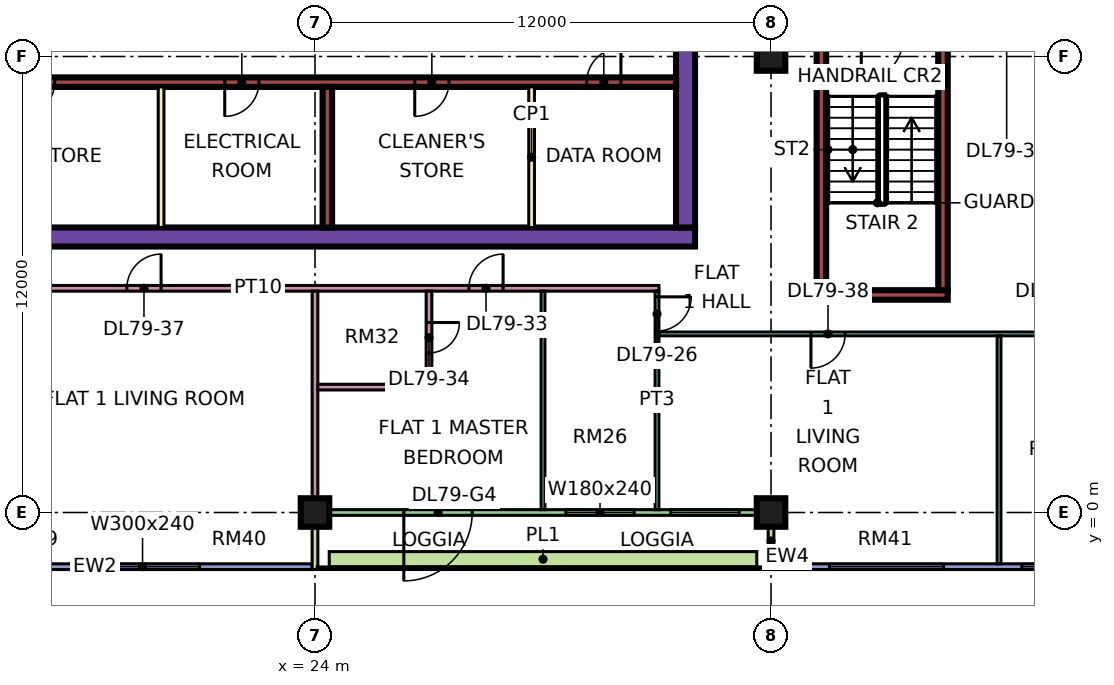
"""IFC4 building model, lengths in metres.
Left out: names, types, materials, properties, quantities, classifications, styles, units other than length and angle.
Written with IfcOpenShell. Run it as: python <this file> out.ifc"""

import sys

from ifc_helpers import new_model, si_unit, direction, frame, frame_2d, origin, origin_2d, place, context, subcontext, project, spatial, rectangle, extrude, element, fill, save


model = new_model("IFC4")
c1 = context("Model", 3, precision=1e-05, world=origin(), true_north=direction((0.0, 1.0)))
c2 = subcontext(c1, "Body", "Model", "MODEL_VIEW")
j1 = project(units=[si_unit("LENGTHUNIT", "METRE"), si_unit("PLANEANGLEUNIT", "RADIAN")], contexts=[c1])
p1 = place(None, origin())
s1 = spatial("IfcSite", under=j1, at=p1, CompositionType="ELEMENT")
p2 = place(p1, origin())
s2 = spatial("IfcBuilding", under=s1, at=p2, CompositionType="ELEMENT")
p3 = place(p2, frame((0.0, 0.0, 342.65)))
s3 = spatial("IfcBuildingStorey", under=s2, at=p3, CompositionType="ELEMENT", Elevation=342.65)
for number, where, z_axis, x_axis in (
    (1, (24.0, 0.0, 0.0), (0.0, 0.0, 1.0), (1.0, 0.0, 0.0)),
    (2, (36.0, 0.0, 0.0), (0.0, 0.0, 1.0), (1.0, 0.0, 0.0)),
    (3, (36.0, 12.0, 0.0), (0.0, 0.0, 1.0), (1.0, 0.0, 0.0)),
):
    element("IfcColumn", number, at=place(p3, frame(where, z_axis=z_axis, x_axis=x_axis)), inside=s3, PredefinedType="COLUMN", context=c2, shape_type="SweptSolid", body=[
        extrude(rectangle(XDim=0.75, YDim=0.75, at=origin_2d()), origin(), (0.0, 0.0, 1.0), 3.75),
    ])
p4 = place(p3, frame((9.0, 7.25, 0.0), z_axis=(0.0, 0.0, 1.0), x_axis=(1.0, 0.0, 0.0)))
e4 = element("IfcWall", 4, at=p4, inside=s3, PredefinedType="SHEAR", context=c2, shape_type="SweptSolid", body=[
    extrude(rectangle(XDim=25.0, YDim=0.5, at=frame_2d((12.5, 0.0))), origin(), (0.0, 0.0, 1.0), 3.75),
])
p5 = place(p3, frame((33.75, 7.5, 0.0), z_axis=(0.0, 0.0, 1.0), x_axis=(0.0, 1.0, 0.0)))
e5 = element("IfcWall", 5, at=p5, inside=s3, PredefinedType="SHEAR", context=c2, shape_type="SweptSolid", body=[
    extrude(rectangle(XDim=12.0, YDim=0.5, at=frame_2d((6.0, 0.0))), origin(), (0.0, 0.0, 1.0), 3.75),
])
p6 = place(p5, frame((5.7, 0.0, 0.0)))
e6 = element("IfcOpeningElement", 6, at=p6, cuts=e5, PredefinedType="OPENING", context=c2, shape_type="SweptSolid", body=[
    extrude(rectangle(XDim=1.8, YDim=2.4, at=frame_2d((0.9, 1.2))), frame((0.0, 0.26, 0.0), z_axis=(0.0, -1.0, 0.0), x_axis=(1.0, 0.0, 0.0)), (0.0, 0.0, 1.0), 0.52),
])
p7 = place(p3, frame((13.45, 11.325, 0.0), z_axis=(0.0, 0.0, 1.0), x_axis=(1.0, 0.0, 0.0)))
e7 = element("IfcWall", 7, at=p7, inside=s3, PredefinedType="SHEAR", context=c2, shape_type="SweptSolid", body=[
    extrude(rectangle(XDim=20.05, YDim=0.25, at=frame_2d((10.025, 0.0))), origin(), (0.0, 0.0, 1.0), 3.75),
])
p8 = place(p7, frame((2.8, 0.0, 0.0)))
e8 = element("IfcOpeningElement", 8, at=p8, cuts=e7, PredefinedType="OPENING", context=c2, shape_type="SweptSolid", body=[
    extrude(rectangle(XDim=0.9, YDim=2.1, at=frame_2d((0.45, 1.05))), frame((0.0, 0.135, 0.0), z_axis=(0.0, -1.0, 0.0), x_axis=(1.0, 0.0, 0.0)), (0.0, 0.0, 1.0), 0.27),
])
p9 = place(p7, frame((8.175, 0.0, 0.0)))
e9 = element("IfcOpeningElement", 9, at=p9, cuts=e7, PredefinedType="OPENING", context=c2, shape_type="SweptSolid", body=[
    extrude(rectangle(XDim=0.9, YDim=2.1, at=frame_2d((0.45, 1.05))), frame((0.0, 0.135, 0.0), z_axis=(0.0, -1.0, 0.0), x_axis=(1.0, 0.0, 0.0)), (0.0, 0.0, 1.0), 0.27),
])
p10 = place(p7, frame((13.175, 0.0, 0.0)))
e10 = element("IfcOpeningElement", 10, at=p10, cuts=e7, PredefinedType="OPENING", context=c2, shape_type="SweptSolid", body=[
    extrude(rectangle(XDim=0.9, YDim=2.1, at=frame_2d((0.45, 1.05))), frame((0.0, 0.135, 0.0), z_axis=(0.0, -1.0, 0.0), x_axis=(1.0, 0.0, 0.0)), (0.0, 0.0, 1.0), 0.27),
])
p11 = place(p7, frame((17.7, 0.0, 0.0)))
e11 = element("IfcOpeningElement", 11, at=p11, cuts=e7, PredefinedType="OPENING", context=c2, shape_type="SweptSolid", body=[
    extrude(rectangle(XDim=0.9, YDim=2.1, at=frame_2d((0.45, 1.05))), frame((0.0, 0.135, 0.0), z_axis=(0.0, -1.0, 0.0), x_axis=(1.0, 0.0, 0.0)), (0.0, 0.0, 1.0), 0.27),
])
p12 = place(p3, frame((24.325, 7.5, 0.0), z_axis=(0.0, 0.0, 1.0), x_axis=(0.0, 1.0, 0.0)))
e12 = element("IfcWall", 12, at=p12, inside=s3, PredefinedType="SHEAR", context=c2, shape_type="SweptSolid", body=[
    extrude(rectangle(XDim=3.7, YDim=0.25, at=frame_2d((1.85, 0.0))), origin(), (0.0, 0.0, 1.0), 3.75),
])
p13 = place(p3, frame((37.2, 5.725, 0.0), z_axis=(0.0, 0.0, 1.0), x_axis=(1.0, 0.0, 0.0)))
e13 = element("IfcWall", 13, at=p13, inside=s3, PredefinedType="SHEAR", context=c2, shape_type="SweptSolid", body=[
    extrude(rectangle(XDim=3.45, YDim=0.25, at=frame_2d((1.725, 0.0))), origin(), (0.0, 0.0, 1.0), 3.75),
])
for number, where, z_axis, x_axis in (
    (14, (37.325, 5.85, 0.0), (0.0, 0.0, 1.0), (0.0, 1.0, 0.0)),
    (15, (40.525, 5.85, 0.0), (0.0, 0.0, 1.0), (0.0, 1.0, 0.0)),
):
    element("IfcWall", number, at=place(p3, frame(where, z_axis=z_axis, x_axis=x_axis)), inside=s3, PredefinedType="SHEAR", context=c2, shape_type="SweptSolid", body=[
        extrude(rectangle(XDim=6.5, YDim=0.25, at=frame_2d((3.25, 0.0))), origin(), (0.0, 0.0, 1.0), 3.75),
    ])
p14 = place(p3, frame((12.5, -1.425, 0.0), z_axis=(0.0, 0.0, 1.0), x_axis=(1.0, 0.0, 0.0)))
e16 = element("IfcWall", 16, at=p14, inside=s3, PredefinedType="SOLIDWALL", context=c2, shape_type="SweptSolid", body=[
    extrude(rectangle(XDim=11.425, YDim=0.15, at=frame_2d((5.712, 0.0))), origin(), (0.0, 0.0, 1.0), 3.35),
])
p15 = place(p14, frame((0.35, 0.0, 0.45)))
e17 = element("IfcOpeningElement", 17, at=p15, cuts=e16, PredefinedType="OPENING", context=c2, shape_type="SweptSolid", body=[
    extrude(rectangle(XDim=1.8, YDim=2.4, at=frame_2d((0.9, 1.2))), frame((0.0, 0.085, 0.0), z_axis=(0.0, -1.0, 0.0), x_axis=(1.0, 0.0, 0.0)), (0.0, 0.0, 1.0), 0.17),
])
p16 = place(p14, frame((5.462, 0.0, 0.45)))
e18 = element("IfcOpeningElement", 18, at=p16, cuts=e16, PredefinedType="OPENING", context=c2, shape_type="SweptSolid", body=[
    extrude(rectangle(XDim=3.0, YDim=2.4, at=frame_2d((1.5, 1.2))), frame((0.0, 0.085, 0.0), z_axis=(0.0, -1.0, 0.0), x_axis=(1.0, 0.0, 0.0)), (0.0, 0.0, 1.0), 0.17),
])
p17 = place(p3, frame((24.075, 0.0, 0.0), z_axis=(0.0, 0.0, 1.0), x_axis=(1.0, 0.0, 0.0)))
e19 = element("IfcWall", 19, at=p17, inside=s3, PredefinedType="SOLIDWALL", context=c2, shape_type="SweptSolid", body=[
    extrude(rectangle(XDim=11.85, YDim=0.15, at=frame_2d((5.925, 0.0))), origin(), (0.0, 0.0, 1.0), 3.35),
])
p18 = place(p17, frame((2.262, 0.0, 0.0)))
e20 = element("IfcOpeningElement", 20, at=p18, cuts=e19, PredefinedType="OPENING", context=c2, shape_type="SweptSolid", body=[
    extrude(rectangle(XDim=1.8, YDim=2.4, at=frame_2d((0.9, 1.2))), frame((0.0, 0.085, 0.0), z_axis=(0.0, -1.0, 0.0), x_axis=(1.0, 0.0, 0.0)), (0.0, 0.0, 1.0), 0.17),
])
p19 = place(p17, frame((6.525, 0.0, 0.45)))
e21 = element("IfcOpeningElement", 21, at=p19, cuts=e19, PredefinedType="OPENING", context=c2, shape_type="SweptSolid", body=[
    extrude(rectangle(XDim=1.8, YDim=2.4, at=frame_2d((0.9, 1.2))), frame((0.0, 0.085, 0.0), z_axis=(0.0, -1.0, 0.0), x_axis=(1.0, 0.0, 0.0)), (0.0, 0.0, 1.0), 0.17),
])
p20 = place(p17, frame((9.288, 0.0, 0.45)))
e22 = element("IfcOpeningElement", 22, at=p20, cuts=e19, PredefinedType="OPENING", context=c2, shape_type="SweptSolid", body=[
    extrude(rectangle(XDim=1.8, YDim=2.4, at=frame_2d((0.9, 1.2))), frame((0.0, 0.085, 0.0), z_axis=(0.0, -1.0, 0.0), x_axis=(1.0, 0.0, 0.0)), (0.0, 0.0, 1.0), 0.17),
])
for number, where, z_axis, x_axis in (
    (23, (24.0, -1.5, 0.0), (0.0, 0.0, 1.0), (0.0, 1.0, 0.0)),
    (24, (36.0, -1.5, 0.0), (0.0, 0.0, 1.0), (0.0, 1.0, 0.0)),
):
    element("IfcWall", number, at=place(p3, frame(where, z_axis=z_axis, x_axis=x_axis)), inside=s3, PredefinedType="SOLIDWALL", context=c2, shape_type="SweptSolid", body=[
        extrude(rectangle(XDim=1.5, YDim=0.15, at=frame_2d((0.75, 0.0))), origin(), (0.0, 0.0, 1.0), 3.35),
    ])
p21 = place(p3, frame((36.075, -1.425, 0.0), z_axis=(0.0, 0.0, 1.0), x_axis=(1.0, 0.0, 0.0)))
e25 = element("IfcWall", 25, at=p21, inside=s3, PredefinedType="SOLIDWALL", context=c2, shape_type="SweptSolid", body=[
    extrude(rectangle(XDim=11.85, YDim=0.15, at=frame_2d((5.925, 0.0))), origin(), (0.0, 0.0, 1.0), 3.35),
])
p22 = place(p21, frame((1.462, 0.0, 0.45)))
e26 = element("IfcOpeningElement", 26, at=p22, cuts=e25, PredefinedType="OPENING", context=c2, shape_type="SweptSolid", body=[
    extrude(rectangle(XDim=3.0, YDim=2.4, at=frame_2d((1.5, 1.2))), frame((0.0, 0.085, 0.0), z_axis=(0.0, -1.0, 0.0), x_axis=(1.0, 0.0, 0.0)), (0.0, 0.0, 1.0), 0.17),
])
p23 = place(p21, frame((6.525, 0.0, 0.45)))
e27 = element("IfcOpeningElement", 27, at=p23, cuts=e25, PredefinedType="OPENING", context=c2, shape_type="SweptSolid", body=[
    extrude(rectangle(XDim=1.8, YDim=2.4, at=frame_2d((0.9, 1.2))), frame((0.0, 0.085, 0.0), z_axis=(0.0, -1.0, 0.0), x_axis=(1.0, 0.0, 0.0)), (0.0, 0.0, 1.0), 0.17),
])
p24 = place(p21, frame((9.488, 0.0, 0.45)))
e28 = element("IfcOpeningElement", 28, at=p24, cuts=e25, PredefinedType="OPENING", context=c2, shape_type="SweptSolid", body=[
    extrude(rectangle(XDim=1.8, YDim=2.4, at=frame_2d((0.9, 1.2))), frame((0.0, 0.085, 0.0), z_axis=(0.0, -1.0, 0.0), x_axis=(1.0, 0.0, 0.0)), (0.0, 0.0, 1.0), 0.17),
])
p25 = place(p3, frame((24.375, -1.229, 0.0), z_axis=(0.0, 0.0, 1.0), x_axis=(1.0, 0.0, 0.0)))
e29 = element("IfcWall", 29, at=p25, inside=s3, PredefinedType="SOLIDWALL", context=c2, shape_type="SweptSolid", body=[
    extrude(rectangle(XDim=11.25, YDim=0.4, at=frame_2d((5.625, 0.0))), origin(), (0.0, 0.0, 1.0), 0.7),
])
for number, where, z_axis, x_axis in (
    (30, (19.95, 7.5, 0.0), (0.0, 0.0, 1.0), (0.0, 1.0, 0.0)),
    (31, (29.7, 7.5, 0.0), (0.0, 0.0, 1.0), (0.0, 1.0, 0.0)),
):
    element("IfcWall", number, at=place(p3, frame(where, z_axis=z_axis, x_axis=x_axis)), inside=s3, PredefinedType="PARTITIONING", context=c2, shape_type="SweptSolid", body=[
        extrude(rectangle(XDim=3.7, YDim=0.15, at=frame_2d((1.85, 0.0))), origin(), (0.0, 0.0, 1.0), 3.35),
    ])
p26 = place(p3, frame((11.95, 5.9, 0.0), z_axis=(0.0, 0.0, 1.0), x_axis=(1.0, 0.0, 0.0)))
e32 = element("IfcWall", 32, at=p26, inside=s3, PredefinedType="PARTITIONING", context=c2, shape_type="SweptSolid", body=[
    extrude(rectangle(XDim=21.1, YDim=0.15, at=frame_2d((10.55, 0.0))), origin(), (0.0, 0.0, 1.0), 3.35),
])
p27 = place(p26, frame((1.1, 0.0, 0.0)))
e33 = element("IfcOpeningElement", 33, at=p27, cuts=e32, PredefinedType="OPENING", context=c2, shape_type="SweptSolid", body=[
    extrude(rectangle(XDim=0.9, YDim=2.1, at=frame_2d((0.45, 1.05))), frame((0.0, 0.085, 0.0), z_axis=(0.0, -1.0, 0.0), x_axis=(1.0, 0.0, 0.0)), (0.0, 0.0, 1.0), 0.17),
])
p28 = place(p26, frame((16.1, 0.0, 0.0)))
e34 = element("IfcOpeningElement", 34, at=p28, cuts=e32, PredefinedType="OPENING", context=c2, shape_type="SweptSolid", body=[
    extrude(rectangle(XDim=0.9, YDim=2.1, at=frame_2d((0.45, 1.05))), frame((0.0, 0.085, 0.0), z_axis=(0.0, -1.0, 0.0), x_axis=(1.0, 0.0, 0.0)), (0.0, 0.0, 1.0), 0.17),
])
p29 = place(p26, frame((7.1, 0.0, 0.0)))
e35 = element("IfcOpeningElement", 35, at=p29, cuts=e32, PredefinedType="OPENING", context=c2, shape_type="SweptSolid", body=[
    extrude(rectangle(XDim=0.9, YDim=2.1, at=frame_2d((0.45, 1.05))), frame((0.0, 0.085, 0.0), z_axis=(0.0, -1.0, 0.0), x_axis=(1.0, 0.0, 0.0)), (0.0, 0.0, 1.0), 0.17),
])
p30 = place(p3, frame((24.0, 0.0, 0.0), z_axis=(0.0, 0.0, 1.0), x_axis=(0.0, 1.0, 0.0)))
e36 = element("IfcWall", 36, at=p30, inside=s3, PredefinedType="PARTITIONING", context=c2, shape_type="SweptSolid", body=[
    extrude(rectangle(XDim=5.825, YDim=0.15, at=frame_2d((2.913, 0.0))), origin(), (0.0, 0.0, 1.0), 3.35),
])
p31 = place(p3, frame((24.075, 3.3, 0.0), z_axis=(0.0, 0.0, 1.0), x_axis=(1.0, 0.0, 0.0)))
e37 = element("IfcWall", 37, at=p31, inside=s3, PredefinedType="PARTITIONING", context=c2, shape_type="SweptSolid", body=[
    extrude(rectangle(XDim=3.0, YDim=0.15, at=frame_2d((1.5, 0.0))), origin(), (0.0, 0.0, 1.0), 3.35),
])
p32 = place(p3, frame((27.0, 3.375, 0.0), z_axis=(0.0, 0.0, 1.0), x_axis=(0.0, 1.0, 0.0)))
e38 = element("IfcWall", 38, at=p32, inside=s3, PredefinedType="PARTITIONING", context=c2, shape_type="SweptSolid", body=[
    extrude(rectangle(XDim=2.45, YDim=0.15, at=frame_2d((1.225, 0.0))), origin(), (0.0, 0.0, 1.0), 3.35),
])
p33 = place(p32, frame((0.825, 0.0, 0.0)))
e39 = element("IfcOpeningElement", 39, at=p33, cuts=e38, PredefinedType="OPENING", context=c2, shape_type="SweptSolid", body=[
    extrude(rectangle(XDim=0.8, YDim=2.1, at=frame_2d((0.4, 1.05))), frame((0.0, 0.085, 0.0), z_axis=(0.0, -1.0, 0.0), x_axis=(1.0, 0.0, 0.0)), (0.0, 0.0, 1.0), 0.17),
])
p34 = place(p3, frame((30.0, 0.074, 0.0), z_axis=(0.0, 0.0, 1.0), x_axis=(0.0, 1.0, 0.0)))
e40 = element("IfcWall", 40, at=p34, inside=s3, PredefinedType="PARTITIONING", context=c2, shape_type="SweptSolid", body=[
    extrude(rectangle(XDim=5.751, YDim=0.1, at=frame_2d((2.875, 0.0))), origin(), (0.0, 0.0, 1.0), 3.35),
])
p35 = place(p3, frame((33.0, 0.074, 0.0), z_axis=(0.0, 0.0, 1.0), x_axis=(0.0, 1.0, 0.0)))
e41 = element("IfcWall", 41, at=p35, inside=s3, PredefinedType="PARTITIONING", context=c2, shape_type="SweptSolid", body=[
    extrude(rectangle(XDim=5.751, YDim=0.1, at=frame_2d((2.875, 0.0))), origin(), (0.0, 0.0, 1.0), 3.35),
])
p36 = place(p35, frame((4.701, 0.0, 0.0)))
e42 = element("IfcOpeningElement", 42, at=p36, cuts=e41, PredefinedType="OPENING", context=c2, shape_type="SweptSolid", body=[
    extrude(rectangle(XDim=0.9, YDim=2.1, at=frame_2d((0.45, 1.05))), frame((0.0, 0.06, 0.0), z_axis=(0.0, -1.0, 0.0), x_axis=(1.0, 0.0, 0.0)), (0.0, 0.0, 1.0), 0.12),
])
p37 = place(p3, frame((33.05, 4.7, 0.0), z_axis=(0.0, 0.0, 1.0), x_axis=(1.0, 0.0, 0.0)))
e43 = element("IfcWall", 43, at=p37, inside=s3, PredefinedType="PARTITIONING", context=c2, shape_type="SweptSolid", body=[
    extrude(rectangle(XDim=20.876, YDim=0.1, at=frame_2d((10.438, 0.0))), origin(), (0.0, 0.0, 1.0), 3.35),
])
p38 = place(p37, frame((10.0, 0.0, 0.0)))
e44 = element("IfcOpeningElement", 44, at=p38, cuts=e43, PredefinedType="OPENING", context=c2, shape_type="SweptSolid", body=[
    extrude(rectangle(XDim=0.9, YDim=2.1, at=frame_2d((0.45, 1.05))), frame((0.0, 0.06, 0.0), z_axis=(0.0, -1.0, 0.0), x_axis=(1.0, 0.0, 0.0)), (0.0, 0.0, 1.0), 0.12),
])
p39 = place(p37, frame((13.0, 0.0, 0.0)))
e45 = element("IfcOpeningElement", 45, at=p39, cuts=e43, PredefinedType="OPENING", context=c2, shape_type="SweptSolid", body=[
    extrude(rectangle(XDim=0.9, YDim=2.1, at=frame_2d((0.45, 1.05))), frame((0.0, 0.06, 0.0), z_axis=(0.0, -1.0, 0.0), x_axis=(1.0, 0.0, 0.0)), (0.0, 0.0, 1.0), 0.12),
])
p40 = place(p37, frame((16.0, 0.0, 0.0)))
e46 = element("IfcOpeningElement", 46, at=p40, cuts=e43, PredefinedType="OPENING", context=c2, shape_type="SweptSolid", body=[
    extrude(rectangle(XDim=0.9, YDim=2.1, at=frame_2d((0.45, 1.05))), frame((0.0, 0.06, 0.0), z_axis=(0.0, -1.0, 0.0), x_axis=(1.0, 0.0, 0.0)), (0.0, 0.0, 1.0), 0.12),
])
p41 = place(p37, frame((19.0, 0.0, 0.0)))
e47 = element("IfcOpeningElement", 47, at=p41, cuts=e43, PredefinedType="OPENING", context=c2, shape_type="SweptSolid", body=[
    extrude(rectangle(XDim=0.9, YDim=2.1, at=frame_2d((0.45, 1.05))), frame((0.0, 0.06, 0.0), z_axis=(0.0, -1.0, 0.0), x_axis=(1.0, 0.0, 0.0)), (0.0, 0.0, 1.0), 0.12),
])
p42 = place(p37, frame((4.0, 0.0, 0.0)))
e48 = element("IfcOpeningElement", 48, at=p42, cuts=e43, PredefinedType="OPENING", context=c2, shape_type="SweptSolid", body=[
    extrude(rectangle(XDim=0.9, YDim=2.1, at=frame_2d((0.45, 1.05))), frame((0.0, 0.06, 0.0), z_axis=(0.0, -1.0, 0.0), x_axis=(1.0, 0.0, 0.0)), (0.0, 0.0, 1.0), 0.12),
])
p43 = place(p3, frame((42.0, -1.35, 0.0), z_axis=(0.0, 0.0, 1.0), x_axis=(0.0, 1.0, 0.0)))
e49 = element("IfcWall", 49, at=p43, inside=s3, PredefinedType="PARTITIONING", context=c2, shape_type="SweptSolid", body=[
    extrude(rectangle(XDim=6.0, YDim=0.1, at=frame_2d((3.0, 0.0))), origin(), (0.0, 0.0, 1.0), 3.35),
])
p44 = place(p16, origin())
e50 = element("IfcWindow", 50, at=p44, inside=s3, PartitioningType="SINGLE_PANEL", PredefinedType="WINDOW", context=c2, shape_type="SweptSolid", body=[
    extrude(rectangle(XDim=3.0, YDim=2.4, at=frame_2d((1.5, 1.2))), frame((0.0, 0.03, 0.0), z_axis=(0.0, -1.0, 0.0), x_axis=(1.0, 0.0, 0.0)), (0.0, 0.0, 1.0), 0.06),
])
fill(e18, e50)
p45 = place(p18, frame((1.8, 0.0, 0.0), z_axis=(0.0, 0.0, 1.0), x_axis=(-1.0, 0.0, 0.0)))
e51 = element("IfcDoor", 51, at=p45, inside=s3, OperationType="DOUBLE_DOOR_SINGLE_SWING", PredefinedType="DOOR", context=c2, shape_type="SweptSolid", body=[
    extrude(rectangle(XDim=1.8, YDim=2.4, at=frame_2d((0.9, 1.2))), frame((0.0, 0.025, 0.0), z_axis=(0.0, -1.0, 0.0), x_axis=(1.0, 0.0, 0.0)), (0.0, 0.0, 1.0), 0.05),
])
fill(e20, e51)
p46 = place(p19, origin())
e52 = element("IfcWindow", 52, at=p46, inside=s3, PartitioningType="SINGLE_PANEL", PredefinedType="WINDOW", context=c2, shape_type="SweptSolid", body=[
    extrude(rectangle(XDim=1.8, YDim=2.4, at=frame_2d((0.9, 1.2))), frame((0.0, 0.03, 0.0), z_axis=(0.0, -1.0, 0.0), x_axis=(1.0, 0.0, 0.0)), (0.0, 0.0, 1.0), 0.06),
])
fill(e21, e52)
p47 = place(p20, origin())
e53 = element("IfcWindow", 53, at=p47, inside=s3, PartitioningType="SINGLE_PANEL", PredefinedType="WINDOW", context=c2, shape_type="SweptSolid", body=[
    extrude(rectangle(XDim=1.8, YDim=2.4, at=frame_2d((0.9, 1.2))), frame((0.0, 0.03, 0.0), z_axis=(0.0, -1.0, 0.0), x_axis=(1.0, 0.0, 0.0)), (0.0, 0.0, 1.0), 0.06),
])
fill(e22, e53)
p48 = place(p22, origin())
e54 = element("IfcWindow", 54, at=p48, inside=s3, PartitioningType="SINGLE_PANEL", PredefinedType="WINDOW", context=c2, shape_type="SweptSolid", body=[
    extrude(rectangle(XDim=3.0, YDim=2.4, at=frame_2d((1.5, 1.2))), frame((0.0, 0.03, 0.0), z_axis=(0.0, -1.0, 0.0), x_axis=(1.0, 0.0, 0.0)), (0.0, 0.0, 1.0), 0.06),
])
fill(e26, e54)
p49 = place(p23, origin())
e55 = element("IfcWindow", 55, at=p49, inside=s3, PartitioningType="SINGLE_PANEL", PredefinedType="WINDOW", context=c2, shape_type="SweptSolid", body=[
    extrude(rectangle(XDim=1.8, YDim=2.4, at=frame_2d((0.9, 1.2))), frame((0.0, 0.03, 0.0), z_axis=(0.0, -1.0, 0.0), x_axis=(1.0, 0.0, 0.0)), (0.0, 0.0, 1.0), 0.06),
])
fill(e27, e55)
p50 = place(p8, frame((0.9, 0.0, 0.0), z_axis=(0.0, 0.0, 1.0), x_axis=(-1.0, 0.0, 0.0)))
e56 = element("IfcDoor", 56, at=p50, inside=s3, OperationType="SINGLE_SWING_LEFT", PredefinedType="DOOR", context=c2, shape_type="SweptSolid", body=[
    extrude(rectangle(XDim=0.9, YDim=2.1, at=frame_2d((0.45, 1.05))), frame((0.0, 0.025, 0.0), z_axis=(0.0, -1.0, 0.0), x_axis=(1.0, 0.0, 0.0)), (0.0, 0.0, 1.0), 0.05),
])
fill(e8, e56)
p51 = place(p9, frame((0.9, 0.0, 0.0), z_axis=(0.0, 0.0, 1.0), x_axis=(-1.0, 0.0, 0.0)))
e57 = element("IfcDoor", 57, at=p51, inside=s3, OperationType="SINGLE_SWING_LEFT", PredefinedType="DOOR", context=c2, shape_type="SweptSolid", body=[
    extrude(rectangle(XDim=0.9, YDim=2.1, at=frame_2d((0.45, 1.05))), frame((0.0, 0.025, 0.0), z_axis=(0.0, -1.0, 0.0), x_axis=(1.0, 0.0, 0.0)), (0.0, 0.0, 1.0), 0.05),
])
fill(e9, e57)
p52 = place(p10, frame((0.9, 0.0, 0.0), z_axis=(0.0, 0.0, 1.0), x_axis=(-1.0, 0.0, 0.0)))
e58 = element("IfcDoor", 58, at=p52, inside=s3, OperationType="SINGLE_SWING_LEFT", PredefinedType="DOOR", context=c2, shape_type="SweptSolid", body=[
    extrude(rectangle(XDim=0.9, YDim=2.1, at=frame_2d((0.45, 1.05))), frame((0.0, 0.025, 0.0), z_axis=(0.0, -1.0, 0.0), x_axis=(1.0, 0.0, 0.0)), (0.0, 0.0, 1.0), 0.05),
])
fill(e10, e58)
p53 = place(p11, frame((0.9, 0.0, 0.0), z_axis=(0.0, 0.0, 1.0), x_axis=(-1.0, 0.0, 0.0)))
e59 = element("IfcDoor", 59, at=p53, inside=s3, OperationType="SINGLE_SWING_RIGHT", PredefinedType="DOOR", context=c2, shape_type="SweptSolid", body=[
    extrude(rectangle(XDim=0.9, YDim=2.1, at=frame_2d((0.45, 1.05))), frame((0.0, 0.025, 0.0), z_axis=(0.0, -1.0, 0.0), x_axis=(1.0, 0.0, 0.0)), (0.0, 0.0, 1.0), 0.05),
])
fill(e11, e59)
p54 = place(p36, origin())
e60 = element("IfcDoor", 60, at=p54, inside=s3, OperationType="SINGLE_SWING_RIGHT", PredefinedType="DOOR", context=c2, shape_type="SweptSolid", body=[
    extrude(rectangle(XDim=0.9, YDim=2.1, at=frame_2d((0.45, 1.05))), frame((0.0, 0.025, 0.0), z_axis=(0.0, -1.0, 0.0), x_axis=(1.0, 0.0, 0.0)), (0.0, 0.0, 1.0), 0.05),
])
fill(e42, e60)
p55 = place(p28, frame((0.9, 0.0, 0.0), z_axis=(0.0, 0.0, 1.0), x_axis=(-1.0, 0.0, 0.0)))
e61 = element("IfcDoor", 61, at=p55, inside=s3, OperationType="SINGLE_SWING_RIGHT", PredefinedType="DOOR", context=c2, shape_type="SweptSolid", body=[
    extrude(rectangle(XDim=0.9, YDim=2.1, at=frame_2d((0.45, 1.05))), frame((0.0, 0.025, 0.0), z_axis=(0.0, -1.0, 0.0), x_axis=(1.0, 0.0, 0.0)), (0.0, 0.0, 1.0), 0.05),
])
fill(e34, e61)
p56 = place(p33, origin())
e62 = element("IfcDoor", 62, at=p56, inside=s3, OperationType="SINGLE_SWING_RIGHT", PredefinedType="DOOR", context=c2, shape_type="SweptSolid", body=[
    extrude(rectangle(XDim=0.8, YDim=2.1, at=frame_2d((0.4, 1.05))), frame((0.0, 0.025, 0.0), z_axis=(0.0, -1.0, 0.0), x_axis=(1.0, 0.0, 0.0)), (0.0, 0.0, 1.0), 0.05),
])
fill(e39, e62)
p57 = place(p29, frame((0.9, 0.0, 0.0), z_axis=(0.0, 0.0, 1.0), x_axis=(-1.0, 0.0, 0.0)))
e63 = element("IfcDoor", 63, at=p57, inside=s3, OperationType="SINGLE_SWING_RIGHT", PredefinedType="DOOR", context=c2, shape_type="SweptSolid", body=[
    extrude(rectangle(XDim=0.9, YDim=2.1, at=frame_2d((0.45, 1.05))), frame((0.0, 0.025, 0.0), z_axis=(0.0, -1.0, 0.0), x_axis=(1.0, 0.0, 0.0)), (0.0, 0.0, 1.0), 0.05),
])
fill(e35, e63)
p58 = place(p42, frame((0.9, 0.0, 0.0), z_axis=(0.0, 0.0, 1.0), x_axis=(-1.0, 0.0, 0.0)))
e64 = element("IfcDoor", 64, at=p58, inside=s3, OperationType="SINGLE_SWING_LEFT", PredefinedType="DOOR", context=c2, shape_type="SweptSolid", body=[
    extrude(rectangle(XDim=0.9, YDim=2.1, at=frame_2d((0.45, 1.05))), frame((0.0, 0.025, 0.0), z_axis=(0.0, -1.0, 0.0), x_axis=(1.0, 0.0, 0.0)), (0.0, 0.0, 1.0), 0.05),
])
fill(e48, e64)
save(model, sys.argv[1])
